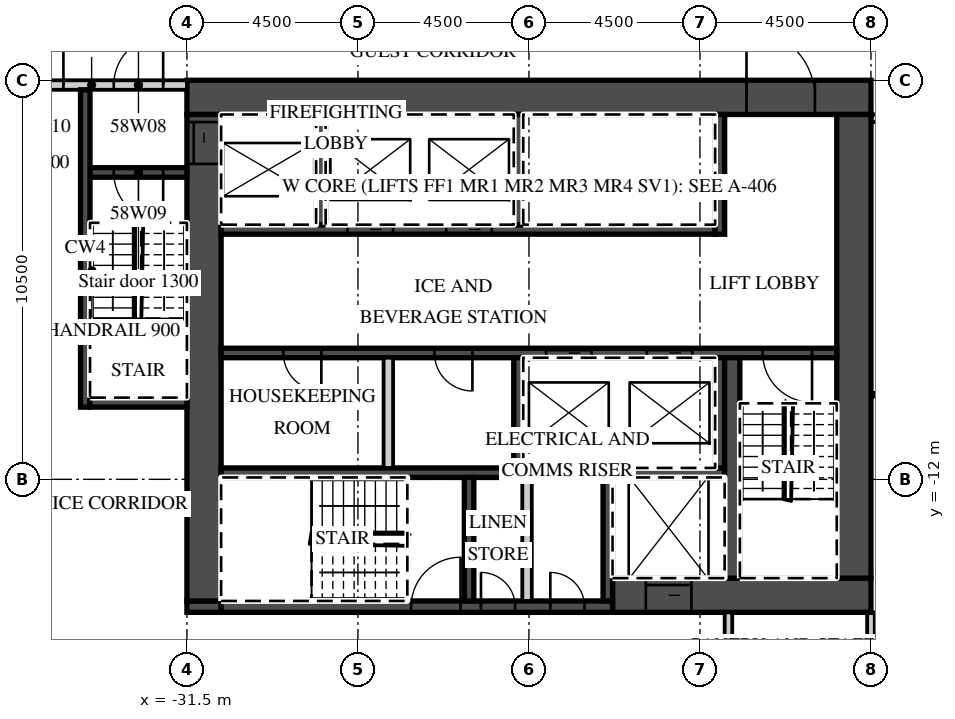
"""IFC4 building model, lengths in metres.
Left out: names, types, materials, properties, quantities, classifications, styles, units other than length and angle.
Written with IfcOpenShell. Run it as: python <this file> out.ifc"""

import sys

from ifc_helpers import new_model, si_unit, direction, frame, frame_2d, origin, place, context, subcontext, project, spatial, rectangle, extrude, element, fill, save


model = new_model("IFC4")
c1 = context("Model", 3, precision=1e-05, world=origin(), true_north=direction((0.0, 1.0)))
c2 = subcontext(c1, "Body", "Model", "MODEL_VIEW")
j1 = project(units=[si_unit("LENGTHUNIT", "METRE"), si_unit("PLANEANGLEUNIT", "RADIAN")], contexts=[c1])
p1 = place(None, origin())
s1 = spatial("IfcSite", under=j1, at=p1, CompositionType="ELEMENT")
p2 = place(p1, origin())
s2 = spatial("IfcBuilding", under=s1, at=p2, CompositionType="ELEMENT")
p3 = place(p2, frame((0.0, 0.0, 237.5)))
s3 = spatial("IfcBuildingStorey", under=s2, at=p3, CompositionType="ELEMENT", Elevation=237.5)
p4 = place(p3, frame((-13.5, -19.641, 0.0), z_axis=(0.0, 0.0, 1.0), x_axis=(0.0, 1.0, 0.0)))
e1 = element("IfcWall", 1, at=p4, inside=s3, PredefinedType="PARTITIONING", context=c2, shape_type="SweptSolid", body=[
    extrude(rectangle(XDim=4.141, YDim=0.2, at=frame_2d((2.071, 0.0))), origin(), (0.0, 0.0, 1.0), 3.02),
])
p5 = place(p3, frame((-13.5, -2.5, 0.0), z_axis=(0.0, 0.0, 1.0), x_axis=(1.0, 0.0, 0.0)))
e2 = element("IfcWall", 2, at=p5, inside=s3, PredefinedType="PARTITIONING", context=c2, shape_type="SweptSolid", body=[
    extrude(rectangle(XDim=27.0, YDim=0.2, at=frame_2d((13.5, 0.0))), origin(), (0.0, 0.0, 1.0), 3.02),
])
p6 = place(p5, frame((0.575, 0.0, 0.0)))
e3 = element("IfcOpeningElement", 3, at=p6, cuts=e2, PredefinedType="OPENING", context=c2, shape_type="SweptSolid", body=[
    extrude(rectangle(XDim=1.0, YDim=2.1, at=frame_2d((0.5, 1.05))), frame((0.0, 0.11, 0.0), z_axis=(0.0, -1.0, 0.0), x_axis=(1.0, 0.0, 0.0)), (0.0, 0.0, 1.0), 0.22),
])
p7 = place(p5, frame((9.863, 0.0, 0.0)))
e4 = element("IfcOpeningElement", 4, at=p7, cuts=e2, PredefinedType="OPENING", context=c2, shape_type="SweptSolid", body=[
    extrude(rectangle(XDim=1.2, YDim=2.1, at=frame_2d((0.6, 1.05))), frame((0.0, 0.11, 0.0), z_axis=(0.0, -1.0, 0.0), x_axis=(1.0, 0.0, 0.0)), (0.0, 0.0, 1.0), 0.22),
])
p8 = place(p5, frame((15.938, 0.0, 0.0)))
e5 = element("IfcOpeningElement", 5, at=p8, cuts=e2, PredefinedType="OPENING", context=c2, shape_type="SweptSolid", body=[
    extrude(rectangle(XDim=1.2, YDim=2.1, at=frame_2d((0.6, 1.05))), frame((0.0, 0.11, 0.0), z_axis=(0.0, -1.0, 0.0), x_axis=(1.0, 0.0, 0.0)), (0.0, 0.0, 1.0), 0.22),
])
p9 = place(p5, frame((23.075, 0.0, 0.0)))
e6 = element("IfcOpeningElement", 6, at=p9, cuts=e2, PredefinedType="OPENING", context=c2, shape_type="SweptSolid", body=[
    extrude(rectangle(XDim=1.0, YDim=2.1, at=frame_2d((0.5, 1.05))), frame((0.0, 0.11, 0.0), z_axis=(0.0, -1.0, 0.0), x_axis=(1.0, 0.0, 0.0)), (0.0, 0.0, 1.0), 0.22),
])
p10 = place(p3, frame((-31.5, -1.95, 0.0), z_axis=(0.0, 0.0, 1.0), x_axis=(1.0, 0.0, 0.0)))
e7 = element("IfcWall", 7, at=p10, inside=s3, PredefinedType="SHEAR", context=c2, shape_type="SweptSolid", body=[
    extrude(rectangle(XDim=18.0, YDim=0.9, at=frame_2d((9.0, 0.0))), origin(), (0.0, 0.0, 1.0), 3.02),
])
p11 = place(p10, frame((14.725, 0.0, 0.0)))
e8 = element("IfcOpeningElement", 8, at=p11, cuts=e7, PredefinedType="OPENING", context=c2, shape_type="SweptSolid", body=[
    extrude(rectangle(XDim=1.8, YDim=2.1, at=frame_2d((0.9, 1.05))), frame((0.0, 0.46, 0.0), z_axis=(0.0, -1.0, 0.0), x_axis=(1.0, 0.0, 0.0)), (0.0, 0.0, 1.0), 0.92),
])
p12 = place(p3, frame((-20.3, -15.05, 0.0), z_axis=(0.0, 0.0, 1.0), x_axis=(1.0, 0.0, 0.0)))
e9 = element("IfcWall", 9, at=p12, inside=s3, PredefinedType="SHEAR", context=c2, shape_type="SweptSolid", body=[
    extrude(rectangle(XDim=6.8, YDim=0.9, at=frame_2d((3.4, 0.0))), origin(), (0.0, 0.0, 1.0), 3.02),
])
p13 = place(p12, frame((0.875, 0.0, 0.0)))
e10 = element("IfcOpeningElement", 10, at=p13, cuts=e9, PredefinedType="OPENING", context=c2, shape_type="SweptSolid", body=[
    extrude(rectangle(XDim=1.2, YDim=2.1, at=frame_2d((0.6, 1.05))), frame((0.0, 0.46, 0.0), z_axis=(0.0, -1.0, 0.0), x_axis=(1.0, 0.0, 0.0)), (0.0, 0.0, 1.0), 0.92),
])
p14 = place(p3, frame((-31.5, -15.35, 0.0), z_axis=(0.0, 0.0, 1.0), x_axis=(1.0, 0.0, 0.0)))
e11 = element("IfcWall", 11, at=p14, inside=s3, PredefinedType="SHEAR", context=c2, shape_type="SweptSolid", body=[
    extrude(rectangle(XDim=0.9, YDim=0.3, at=frame_2d((0.45, 0.0))), origin(), (0.0, 0.0, 1.0), 3.02),
])
p15 = place(p3, frame((-30.6, -15.35, 0.0), z_axis=(0.0, 0.0, 1.0), x_axis=(1.0, 0.0, 0.0)))
e12 = element("IfcWall", 12, at=p15, inside=s3, PredefinedType="SHEAR", context=c2, shape_type="SweptSolid", body=[
    extrude(rectangle(XDim=10.3, YDim=0.3, at=frame_2d((5.15, 0.0))), origin(), (0.0, 0.0, 1.0), 3.02),
])
p16 = place(p15, frame((5.0, 0.0, 0.0)))
e13 = element("IfcOpeningElement", 13, at=p16, cuts=e12, PredefinedType="OPENING", context=c2, shape_type="SweptSolid", body=[
    extrude(rectangle(XDim=1.3, YDim=2.1, at=frame_2d((0.65, 1.05))), frame((0.0, 0.16, 0.0), z_axis=(0.0, -1.0, 0.0), x_axis=(1.0, 0.0, 0.0)), (0.0, 0.0, 1.0), 0.32),
])
p17 = place(p15, frame((6.837, 0.0, 0.0)))
e14 = element("IfcOpeningElement", 14, at=p17, cuts=e12, PredefinedType="OPENING", context=c2, shape_type="SweptSolid", body=[
    extrude(rectangle(XDim=0.9, YDim=2.1, at=frame_2d((0.45, 1.05))), frame((0.0, 0.16, 0.0), z_axis=(0.0, -1.0, 0.0), x_axis=(1.0, 0.0, 0.0)), (0.0, 0.0, 1.0), 0.32),
])
p18 = place(p15, frame((8.663, 0.0, 0.0)))
e15 = element("IfcOpeningElement", 15, at=p18, cuts=e12, PredefinedType="OPENING", context=c2, shape_type="SweptSolid", body=[
    extrude(rectangle(XDim=0.9, YDim=2.1, at=frame_2d((0.45, 1.05))), frame((0.0, 0.16, 0.0), z_axis=(0.0, -1.0, 0.0), x_axis=(1.0, 0.0, 0.0)), (0.0, 0.0, 1.0), 0.32),
])
p19 = place(p3, frame((-31.05, -15.2, 0.0), z_axis=(0.0, 0.0, 1.0), x_axis=(0.0, 1.0, 0.0)))
e16 = element("IfcWall", 16, at=p19, inside=s3, PredefinedType="SHEAR", context=c2, shape_type="SweptSolid", body=[
    extrude(rectangle(XDim=12.8, YDim=0.9, at=frame_2d((6.4, 0.0))), origin(), (0.0, 0.0, 1.0), 3.02),
])
p20 = place(p19, frame((11.5, 0.0, 0.0)))
e17 = element("IfcOpeningElement", 17, at=p20, cuts=e16, PredefinedType="OPENING", context=c2, shape_type="SweptSolid", body=[
    extrude(rectangle(XDim=1.1, YDim=2.1, at=frame_2d((0.55, 1.05))), frame((0.0, 0.46, 0.0), z_axis=(0.0, -1.0, 0.0), x_axis=(1.0, 0.0, 0.0)), (0.0, 0.0, 1.0), 0.92),
])
p21 = place(p3, frame((-13.95, -14.6, 0.0), z_axis=(0.0, 0.0, 1.0), x_axis=(0.0, 1.0, 0.0)))
e18 = element("IfcWall", 18, at=p21, inside=s3, PredefinedType="SHEAR", context=c2, shape_type="SweptSolid", body=[
    extrude(rectangle(XDim=12.2, YDim=0.9, at=frame_2d((6.1, 0.0))), origin(), (0.0, 0.0, 1.0), 3.02),
])
p22 = place(p3, frame((-30.6, -5.425, 0.0), z_axis=(0.0, 0.0, 1.0), x_axis=(1.0, 0.0, 0.0)))
e19 = element("IfcWall", 19, at=p22, inside=s3, PredefinedType="SHEAR", context=c2, shape_type="SweptSolid", body=[
    extrude(rectangle(XDim=13.0, YDim=0.25, at=frame_2d((6.5, 0.0))), origin(), (0.0, 0.0, 1.0), 3.02),
])
p23 = place(p22, frame((3.325, 0.0, 0.0)))
e20 = element("IfcOpeningElement", 20, at=p23, cuts=e19, PredefinedType="OPENING", context=c2, shape_type="SweptSolid", body=[
    extrude(rectangle(XDim=1.2, YDim=2.1, at=frame_2d((0.6, 1.05))), frame((0.0, 0.135, 0.0), z_axis=(0.0, -1.0, 0.0), x_axis=(1.0, 0.0, 0.0)), (0.0, 0.0, 1.0), 0.27),
])
p24 = place(p22, frame((5.925, 0.0, 0.0)))
e21 = element("IfcOpeningElement", 21, at=p24, cuts=e19, PredefinedType="OPENING", context=c2, shape_type="SweptSolid", body=[
    extrude(rectangle(XDim=1.2, YDim=2.1, at=frame_2d((0.6, 1.05))), frame((0.0, 0.135, 0.0), z_axis=(0.0, -1.0, 0.0), x_axis=(1.0, 0.0, 0.0)), (0.0, 0.0, 1.0), 0.27),
])
p25 = place(p3, frame((-17.475, -5.55, 0.0), z_axis=(0.0, 0.0, 1.0), x_axis=(0.0, 1.0, 0.0)))
e22 = element("IfcWall", 22, at=p25, inside=s3, PredefinedType="SHEAR", context=c2, shape_type="SweptSolid", body=[
    extrude(rectangle(XDim=3.15, YDim=0.25, at=frame_2d((1.575, 0.0))), origin(), (0.0, 0.0, 1.0), 3.02),
])
for number, where, z_axis, x_axis in (
    (23, (-27.975, -5.3, 0.0), (0.0, 0.0, 1.0), (0.0, 1.0, 0.0)),
    (24, (-22.775, -5.3, 0.0), (0.0, 0.0, 1.0), (0.0, 1.0, 0.0)),
):
    element("IfcWall", number, at=place(p3, frame(where, z_axis=z_axis, x_axis=x_axis)), inside=s3, PredefinedType="SHEAR", context=c2, shape_type="SweptSolid", body=[
        extrude(rectangle(XDim=2.9, YDim=0.25, at=frame_2d((1.45, 0.0))), origin(), (0.0, 0.0, 1.0), 3.02),
    ])
p26 = place(p3, frame((-30.6, -8.675, 0.0), z_axis=(0.0, 0.0, 1.0), x_axis=(1.0, 0.0, 0.0)))
e25 = element("IfcWall", 25, at=p26, inside=s3, PredefinedType="SHEAR", context=c2, shape_type="SweptSolid", body=[
    extrude(rectangle(XDim=16.2, YDim=0.25, at=frame_2d((8.1, 0.0))), origin(), (0.0, 0.0, 1.0), 3.02),
])
p27 = place(p26, frame((8.55, 0.0, 0.0)))
e26 = element("IfcOpeningElement", 26, at=p27, cuts=e25, PredefinedType="OPENING", context=c2, shape_type="SweptSolid", body=[
    extrude(rectangle(XDim=1.2, YDim=2.1, at=frame_2d((0.6, 1.05))), frame((0.0, 0.135, 0.0), z_axis=(0.0, -1.0, 0.0), x_axis=(1.0, 0.0, 0.0)), (0.0, 0.0, 1.0), 0.27),
])
p28 = place(p26, frame((11.2, 0.0, 0.0)))
e27 = element("IfcOpeningElement", 27, at=p28, cuts=e25, PredefinedType="OPENING", context=c2, shape_type="SweptSolid", body=[
    extrude(rectangle(XDim=1.2, YDim=2.1, at=frame_2d((0.6, 1.05))), frame((0.0, 0.135, 0.0), z_axis=(0.0, -1.0, 0.0), x_axis=(1.0, 0.0, 0.0)), (0.0, 0.0, 1.0), 0.27),
])
p29 = place(p26, frame((14.25, 0.0, 0.0)))
e28 = element("IfcOpeningElement", 28, at=p29, cuts=e25, PredefinedType="OPENING", context=c2, shape_type="SweptSolid", body=[
    extrude(rectangle(XDim=1.3, YDim=2.1, at=frame_2d((0.65, 1.05))), frame((0.0, 0.135, 0.0), z_axis=(0.0, -1.0, 0.0), x_axis=(1.0, 0.0, 0.0)), (0.0, 0.0, 1.0), 0.27),
])
p30 = place(p26, frame((1.637, 0.0, 0.0)))
e29 = element("IfcOpeningElement", 29, at=p30, cuts=e25, PredefinedType="OPENING", context=c2, shape_type="SweptSolid", body=[
    extrude(rectangle(XDim=1.0, YDim=2.1, at=frame_2d((0.5, 1.05))), frame((0.0, 0.135, 0.0), z_axis=(0.0, -1.0, 0.0), x_axis=(1.0, 0.0, 0.0)), (0.0, 0.0, 1.0), 0.27),
])
p31 = place(p26, frame((5.613, 0.0, 0.0)))
e30 = element("IfcOpeningElement", 30, at=p31, cuts=e25, PredefinedType="OPENING", context=c2, shape_type="SweptSolid", body=[
    extrude(rectangle(XDim=1.0, YDim=2.1, at=frame_2d((0.5, 1.05))), frame((0.0, 0.135, 0.0), z_axis=(0.0, -1.0, 0.0), x_axis=(1.0, 0.0, 0.0)), (0.0, 0.0, 1.0), 0.27),
])
p32 = place(p3, frame((-30.6, -11.825, 0.0), z_axis=(0.0, 0.0, 1.0), x_axis=(1.0, 0.0, 0.0)))
e31 = element("IfcWall", 31, at=p32, inside=s3, PredefinedType="SHEAR", context=c2, shape_type="SweptSolid", body=[
    extrude(rectangle(XDim=13.25, YDim=0.25, at=frame_2d((6.625, 0.0))), origin(), (0.0, 0.0, 1.0), 3.02),
])
for number, where, z_axis, x_axis in (
    (32, (-17.475, -11.7, 0.0), (0.0, 0.0, 1.0), (0.0, 1.0, 0.0)),
    (33, (-22.775, -11.7, 0.0), (0.0, 0.0, 1.0), (0.0, 1.0, 0.0)),
):
    element("IfcWall", number, at=place(p3, frame(where, z_axis=z_axis, x_axis=x_axis)), inside=s3, PredefinedType="SHEAR", context=c2, shape_type="SweptSolid", body=[
        extrude(rectangle(XDim=2.9, YDim=0.25, at=frame_2d((1.45, 0.0))), origin(), (0.0, 0.0, 1.0), 3.02),
    ])
p33 = place(p3, frame((-26.2, -11.7, 0.0), z_axis=(0.0, 0.0, 1.0), x_axis=(0.0, 1.0, 0.0)))
e34 = element("IfcWall", 34, at=p33, inside=s3, PredefinedType="PARTITIONING", context=c2, shape_type="SweptSolid", body=[
    extrude(rectangle(XDim=2.9, YDim=0.25, at=frame_2d((1.45, 0.0))), origin(), (0.0, 0.0, 1.0), 3.02),
])
p34 = place(p3, frame((-17.15, -14.6, 0.0), z_axis=(0.0, 0.0, 1.0), x_axis=(0.0, 1.0, 0.0)))
e35 = element("IfcWall", 35, at=p34, inside=s3, PredefinedType="SHEAR", context=c2, shape_type="SweptSolid", body=[
    extrude(rectangle(XDim=5.8, YDim=0.4, at=frame_2d((2.9, 0.0))), origin(), (0.0, 0.0, 1.0), 3.02),
])
for number, where, z_axis, x_axis in (
    (36, (-20.425, -15.2, 0.0), (0.0, 0.0, 1.0), (0.0, 1.0, 0.0)),
    (37, (-24.075, -15.2, 0.0), (0.0, 0.0, 1.0), (0.0, 1.0, 0.0)),
):
    element("IfcWall", number, at=place(p3, frame(where, z_axis=z_axis, x_axis=x_axis)), inside=s3, PredefinedType="SHEAR", context=c2, shape_type="SweptSolid", body=[
        extrude(rectangle(XDim=3.25, YDim=0.25, at=frame_2d((1.625, 0.0))), origin(), (0.0, 0.0, 1.0), 3.02),
    ])
p35 = place(p3, frame((-22.55, -15.2, 0.0), z_axis=(0.0, 0.0, 1.0), x_axis=(0.0, 1.0, 0.0)))
e38 = element("IfcWall", 38, at=p35, inside=s3, PredefinedType="PARTITIONING", context=c2, shape_type="SweptSolid", body=[
    extrude(rectangle(XDim=3.25, YDim=0.25, at=frame_2d((1.625, 0.0))), origin(), (0.0, 0.0, 1.0), 3.02),
])
p36 = place(p3, frame((-36.515, -1.625, 0.0), z_axis=(0.0, 0.0, 1.0), x_axis=(1.0, 0.0, 0.0)))
e39 = element("IfcWall", 39, at=p36, inside=s3, PredefinedType="PARTITIONING", context=c2, shape_type="SweptSolid", body=[
    extrude(rectangle(XDim=5.015, YDim=0.25, at=frame_2d((2.508, 0.0))), origin(), (0.0, 0.0, 1.0), 3.02),
])
p37 = place(p36, frame((3.09, 0.0, 0.0)))
e40 = element("IfcOpeningElement", 40, at=p37, cuts=e39, PredefinedType="OPENING", context=c2, shape_type="SweptSolid", body=[
    extrude(rectangle(XDim=1.3, YDim=2.1, at=frame_2d((0.65, 1.05))), frame((0.0, 0.135, 0.0), z_axis=(0.0, -1.0, 0.0), x_axis=(1.0, 0.0, 0.0)), (0.0, 0.0, 1.0), 0.27),
])
p38 = place(p36, frame((0.665, 0.0, 0.0)))
e41 = element("IfcOpeningElement", 41, at=p38, cuts=e39, PredefinedType="OPENING", context=c2, shape_type="SweptSolid", body=[
    extrude(rectangle(XDim=1.1, YDim=2.1, at=frame_2d((0.55, 1.05))), frame((0.0, 0.135, 0.0), z_axis=(0.0, -1.0, 0.0), x_axis=(1.0, 0.0, 0.0)), (0.0, 0.0, 1.0), 0.27),
])
p39 = place(p3, frame((-34.05, -3.925, 0.0), z_axis=(0.0, 0.0, 1.0), x_axis=(1.0, 0.0, 0.0)))
e42 = element("IfcWall", 42, at=p39, inside=s3, PredefinedType="SHEAR", context=c2, shape_type="SweptSolid", body=[
    extrude(rectangle(XDim=2.55, YDim=0.25, at=frame_2d((1.275, 0.0))), origin(), (0.0, 0.0, 1.0), 3.02),
])
p40 = place(p39, frame((0.625, 0.0, 0.0)))
e43 = element("IfcOpeningElement", 43, at=p40, cuts=e42, PredefinedType="OPENING", context=c2, shape_type="SweptSolid", body=[
    extrude(rectangle(XDim=1.3, YDim=2.1, at=frame_2d((0.65, 1.05))), frame((0.0, 0.135, 0.0), z_axis=(0.0, -1.0, 0.0), x_axis=(1.0, 0.0, 0.0)), (0.0, 0.0, 1.0), 0.27),
])
p41 = place(p3, frame((-34.175, -10.1, 0.0), z_axis=(0.0, 0.0, 1.0), x_axis=(0.0, 1.0, 0.0)))
e44 = element("IfcWall", 44, at=p41, inside=s3, PredefinedType="SHEAR", context=c2, shape_type="SweptSolid", body=[
    extrude(rectangle(XDim=8.35, YDim=0.25, at=frame_2d((4.175, 0.0))), origin(), (0.0, 0.0, 1.0), 3.02),
])
p42 = place(p3, frame((-34.05, -9.975, 0.0), z_axis=(0.0, 0.0, 1.0), x_axis=(1.0, 0.0, 0.0)))
e45 = element("IfcWall", 45, at=p42, inside=s3, PredefinedType="SHEAR", context=c2, shape_type="SweptSolid", body=[
    extrude(rectangle(XDim=2.55, YDim=0.25, at=frame_2d((1.275, 0.0))), origin(), (0.0, 0.0, 1.0), 3.02),
])
p43 = place(p3, frame((-17.25, -17.7, 0.0), z_axis=(0.0, 0.0, 1.0), x_axis=(0.0, 1.0, 0.0)))
e46 = element("IfcWall", 46, at=p43, inside=s3, PredefinedType="PARTITIONING", context=c2, shape_type="SweptSolid", body=[
    extrude(rectangle(XDim=2.2, YDim=0.2, at=frame_2d((1.1, 0.0))), origin(), (0.0, 0.0, 1.0), 3.02),
])
p44 = place(p27, origin())
e47 = element("IfcDoor", 47, at=p44, inside=s3, OperationType="SLIDING_TO_LEFT", PredefinedType="DOOR", context=c2, shape_type="SweptSolid", body=[
    extrude(rectangle(XDim=1.2, YDim=2.1, at=frame_2d((0.6, 1.05))), frame((0.0, 0.025, 0.0), z_axis=(0.0, -1.0, 0.0), x_axis=(1.0, 0.0, 0.0)), (0.0, 0.0, 1.0), 0.05),
])
fill(e26, e47)
p45 = place(p28, origin())
e48 = element("IfcDoor", 48, at=p45, inside=s3, OperationType="SLIDING_TO_RIGHT", PredefinedType="DOOR", context=c2, shape_type="SweptSolid", body=[
    extrude(rectangle(XDim=1.2, YDim=2.1, at=frame_2d((0.6, 1.05))), frame((0.0, 0.025, 0.0), z_axis=(0.0, -1.0, 0.0), x_axis=(1.0, 0.0, 0.0)), (0.0, 0.0, 1.0), 0.05),
])
fill(e27, e48)
p46 = place(p23, origin())
e49 = element("IfcDoor", 49, at=p46, inside=s3, OperationType="SLIDING_TO_RIGHT", PredefinedType="DOOR", context=c2, shape_type="SweptSolid", body=[
    extrude(rectangle(XDim=1.2, YDim=2.1, at=frame_2d((0.6, 1.05))), frame((0.0, 0.025, 0.0), z_axis=(0.0, -1.0, 0.0), x_axis=(1.0, 0.0, 0.0)), (0.0, 0.0, 1.0), 0.05),
])
fill(e20, e49)
p47 = place(p24, origin())
e50 = element("IfcDoor", 50, at=p47, inside=s3, OperationType="SLIDING_TO_RIGHT", PredefinedType="DOOR", context=c2, shape_type="SweptSolid", body=[
    extrude(rectangle(XDim=1.2, YDim=2.1, at=frame_2d((0.6, 1.05))), frame((0.0, 0.025, 0.0), z_axis=(0.0, -1.0, 0.0), x_axis=(1.0, 0.0, 0.0)), (0.0, 0.0, 1.0), 0.05),
])
fill(e21, e50)
p48 = place(p13, origin())
e51 = element("IfcDoor", 51, at=p48, inside=s3, OperationType="SLIDING_TO_LEFT", PredefinedType="DOOR", context=c2, shape_type="SweptSolid", body=[
    extrude(rectangle(XDim=1.2, YDim=2.1, at=frame_2d((0.6, 1.05))), frame((0.0, 0.025, 0.0), z_axis=(0.0, -1.0, 0.0), x_axis=(1.0, 0.0, 0.0)), (0.0, 0.0, 1.0), 0.05),
])
fill(e10, e51)
p49 = place(p20, origin())
e52 = element("IfcDoor", 52, at=p49, inside=s3, OperationType="SLIDING_TO_RIGHT", PredefinedType="DOOR", context=c2, shape_type="SweptSolid", body=[
    extrude(rectangle(XDim=1.1, YDim=2.1, at=frame_2d((0.55, 1.05))), frame((0.0, 0.025, 0.0), z_axis=(0.0, -1.0, 0.0), x_axis=(1.0, 0.0, 0.0)), (0.0, 0.0, 1.0), 0.05),
])
fill(e17, e52)
p50 = place(p11, origin())
e53 = element("IfcDoor", 53, at=p50, inside=s3, OperationType="DOUBLE_DOOR_DOUBLE_SWING", PredefinedType="DOOR", context=c2, shape_type="SweptSolid", body=[
    extrude(rectangle(XDim=1.8, YDim=2.1, at=frame_2d((0.9, 1.05))), frame((0.0, 0.025, 0.0), z_axis=(0.0, -1.0, 0.0), x_axis=(1.0, 0.0, 0.0)), (0.0, 0.0, 1.0), 0.05),
])
fill(e8, e53)
p51 = place(p37, origin())
e54 = element("IfcDoor", 54, at=p51, inside=s3, OperationType="SINGLE_SWING_RIGHT", PredefinedType="DOOR", context=c2, shape_type="SweptSolid", body=[
    extrude(rectangle(XDim=1.3, YDim=2.1, at=frame_2d((0.65, 1.05))), frame((0.0, 0.025, 0.0), z_axis=(0.0, -1.0, 0.0), x_axis=(1.0, 0.0, 0.0)), (0.0, 0.0, 1.0), 0.05),
])
fill(e40, e54)
p52 = place(p40, origin())
e55 = element("IfcDoor", 55, at=p52, inside=s3, OperationType="SINGLE_SWING_RIGHT", PredefinedType="DOOR", context=c2, shape_type="SweptSolid", body=[
    extrude(rectangle(XDim=1.3, YDim=2.1, at=frame_2d((0.65, 1.05))), frame((0.0, 0.025, 0.0), z_axis=(0.0, -1.0, 0.0), x_axis=(1.0, 0.0, 0.0)), (0.0, 0.0, 1.0), 0.05),
])
fill(e43, e55)
p53 = place(p38, origin())
e56 = element("IfcDoor", 56, at=p53, inside=s3, OperationType="SINGLE_SWING_RIGHT", PredefinedType="DOOR", context=c2, shape_type="SweptSolid", body=[
    extrude(rectangle(XDim=1.1, YDim=2.1, at=frame_2d((0.55, 1.05))), frame((0.0, 0.025, 0.0), z_axis=(0.0, -1.0, 0.0), x_axis=(1.0, 0.0, 0.0)), (0.0, 0.0, 1.0), 0.05),
])
fill(e41, e56)
p54 = place(p29, origin())
e57 = element("IfcDoor", 57, at=p54, inside=s3, OperationType="SINGLE_SWING_RIGHT", PredefinedType="DOOR", context=c2, shape_type="SweptSolid", body=[
    extrude(rectangle(XDim=1.3, YDim=2.1, at=frame_2d((0.65, 1.05))), frame((0.0, 0.025, 0.0), z_axis=(0.0, -1.0, 0.0), x_axis=(1.0, 0.0, 0.0)), (0.0, 0.0, 1.0), 0.05),
])
fill(e28, e57)
p55 = place(p16, origin())
e58 = element("IfcDoor", 58, at=p55, inside=s3, OperationType="SINGLE_SWING_RIGHT", PredefinedType="DOOR", context=c2, shape_type="SweptSolid", body=[
    extrude(rectangle(XDim=1.3, YDim=2.1, at=frame_2d((0.65, 1.05))), frame((0.0, 0.025, 0.0), z_axis=(0.0, -1.0, 0.0), x_axis=(1.0, 0.0, 0.0)), (0.0, 0.0, 1.0), 0.05),
])
fill(e13, e58)
p56 = place(p17, origin())
e59 = element("IfcDoor", 59, at=p56, inside=s3, OperationType="SINGLE_SWING_LEFT", PredefinedType="DOOR", context=c2, shape_type="SweptSolid", body=[
    extrude(rectangle(XDim=0.9, YDim=2.1, at=frame_2d((0.45, 1.05))), frame((0.0, 0.025, 0.0), z_axis=(0.0, -1.0, 0.0), x_axis=(1.0, 0.0, 0.0)), (0.0, 0.0, 1.0), 0.05),
])
fill(e14, e59)
p57 = place(p18, origin())
e60 = element("IfcDoor", 60, at=p57, inside=s3, OperationType="SINGLE_SWING_LEFT", PredefinedType="DOOR", context=c2, shape_type="SweptSolid", body=[
    extrude(rectangle(XDim=0.9, YDim=2.1, at=frame_2d((0.45, 1.05))), frame((0.0, 0.025, 0.0), z_axis=(0.0, -1.0, 0.0), x_axis=(1.0, 0.0, 0.0)), (0.0, 0.0, 1.0), 0.05),
])
fill(e15, e60)
p58 = place(p30, origin())
e61 = element("IfcDoor", 61, at=p58, inside=s3, OperationType="SINGLE_SWING_RIGHT", PredefinedType="DOOR", context=c2, shape_type="SweptSolid", body=[
    extrude(rectangle(XDim=1.0, YDim=2.1, at=frame_2d((0.5, 1.05))), frame((0.0, 0.025, 0.0), z_axis=(0.0, -1.0, 0.0), x_axis=(1.0, 0.0, 0.0)), (0.0, 0.0, 1.0), 0.05),
])
fill(e29, e61)
p59 = place(p31, origin())
e62 = element("IfcDoor", 62, at=p59, inside=s3, OperationType="SINGLE_SWING_RIGHT", PredefinedType="DOOR", context=c2, shape_type="SweptSolid", body=[
    extrude(rectangle(XDim=1.0, YDim=2.1, at=frame_2d((0.5, 1.05))), frame((0.0, 0.025, 0.0), z_axis=(0.0, -1.0, 0.0), x_axis=(1.0, 0.0, 0.0)), (0.0, 0.0, 1.0), 0.05),
])
fill(e30, e62)
save(model, sys.argv[1])
